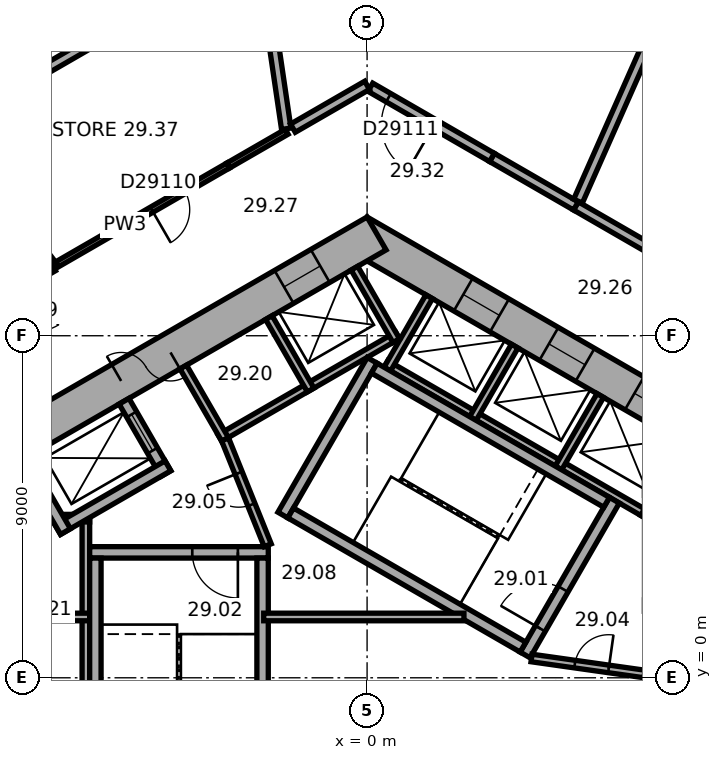
"""IFC4 building model, lengths in metres.
Left out: names, types, materials, properties, quantities, classifications, styles, units other than length and angle.
Written with IfcOpenShell. Run it as: python <this file> out.ifc"""

import sys

from ifc_helpers import new_model, si_unit, direction, frame, frame_2d, origin, place, context, subcontext, project, spatial, rectangle, extrude, element, fill, save


model = new_model("IFC4")
c1 = context("Model", 3, precision=1e-05, world=origin(), true_north=direction((0.0, 1.0)))
c2 = subcontext(c1, "Body", "Model", "MODEL_VIEW")
j1 = project(units=[si_unit("LENGTHUNIT", "METRE"), si_unit("PLANEANGLEUNIT", "RADIAN")], contexts=[c1])
p1 = place(None, origin())
s1 = spatial("IfcSite", under=j1, at=p1, CompositionType="ELEMENT")
p2 = place(p1, origin())
s2 = spatial("IfcBuilding", under=s1, at=p2, CompositionType="ELEMENT")
p3 = place(p2, frame((0.0, 0.0, 119.9)))
s3 = spatial("IfcBuildingStorey", under=s2, at=p3, CompositionType="ELEMENT", Elevation=119.9)
p4 = place(p3, frame((10.25, 5.629, 0.0), z_axis=(0.0, 0.0, 1.0), x_axis=(-0.866022616891, 0.50000482701, 0.0)))
e1 = element("IfcWall", 1, at=p4, inside=s3, PredefinedType="SHEAR", context=c2, shape_type="SweptSolid", body=[
    extrude(rectangle(XDim=12.125, YDim=1.0, at=frame_2d((6.062, 0.0))), origin(), (0.0, 0.0, 1.0), 4.5),
])
p5 = place(p4, frame((2.612, 0.0, 0.0)))
e2 = element("IfcOpeningElement", 2, at=p5, cuts=e1, PredefinedType="OPENING", context=c2, shape_type="SweptSolid", body=[
    extrude(rectangle(XDim=1.1, YDim=2.1, at=frame_2d((0.55, 1.05))), frame((0.0, 0.51, 0.0), z_axis=(0.0, -1.0, 0.0), x_axis=(1.0, 0.0, 0.0)), (0.0, 0.0, 1.0), 1.02),
])
p6 = place(p4, frame((5.212, 0.0, 0.0)))
e3 = element("IfcOpeningElement", 3, at=p6, cuts=e1, PredefinedType="OPENING", context=c2, shape_type="SweptSolid", body=[
    extrude(rectangle(XDim=1.1, YDim=2.1, at=frame_2d((0.55, 1.05))), frame((0.0, 0.51, 0.0), z_axis=(0.0, -1.0, 0.0), x_axis=(1.0, 0.0, 0.0)), (0.0, 0.0, 1.0), 1.02),
])
p7 = place(p4, frame((7.812, 0.0, 0.0)))
e4 = element("IfcOpeningElement", 4, at=p7, cuts=e1, PredefinedType="OPENING", context=c2, shape_type="SweptSolid", body=[
    extrude(rectangle(XDim=1.1, YDim=2.1, at=frame_2d((0.55, 1.05))), frame((0.0, 0.51, 0.0), z_axis=(0.0, -1.0, 0.0), x_axis=(1.0, 0.0, 0.0)), (0.0, 0.0, 1.0), 1.02),
])
p8 = place(p3, frame((0.25, 11.691, 0.0), z_axis=(0.0, 0.0, 1.0), x_axis=(-0.866022616891, -0.50000482701, 0.0)))
e5 = element("IfcWall", 5, at=p8, inside=s3, PredefinedType="SHEAR", context=c2, shape_type="SweptSolid", body=[
    extrude(rectangle(XDim=12.125, YDim=1.0, at=frame_2d((6.062, 0.0))), origin(), (0.0, 0.0, 1.0), 4.5),
])
p9 = place(p8, frame((6.262, 0.0, 0.0)))
e6 = element("IfcOpeningElement", 6, at=p9, cuts=e5, PredefinedType="OPENING", context=c2, shape_type="SweptSolid", body=[
    extrude(rectangle(XDim=1.5, YDim=2.1, at=frame_2d((0.75, 1.05))), frame((0.0, 0.51, 0.0), z_axis=(0.0, -1.0, 0.0), x_axis=(1.0, 0.0, 0.0)), (0.0, 0.0, 1.0), 1.02),
])
p10 = place(p8, frame((1.712, 0.0, 0.0)))
e7 = element("IfcOpeningElement", 7, at=p10, cuts=e5, PredefinedType="OPENING", context=c2, shape_type="SweptSolid", body=[
    extrude(rectangle(XDim=1.1, YDim=2.1, at=frame_2d((0.55, 1.05))), frame((0.0, 0.51, 0.0), z_axis=(0.0, -1.0, 0.0), x_axis=(1.0, 0.0, 0.0)), (0.0, 0.0, 1.0), 1.02),
])
p11 = place(p3, frame((20.63, 15.47, 0.0), z_axis=(0.0, 0.0, 1.0), x_axis=(-0.894934518609, 0.446197498203, 0.0)))
e8 = element("IfcWall", 8, at=p11, inside=s3, PredefinedType="STANDARD", context=c2, shape_type="SweptSolid", body=[
    extrude(rectangle(XDim=21.246, YDim=0.2, at=frame_2d((10.623, 0.0))), origin(), (0.0, 0.0, 1.0), 4.5),
])
p12 = place(p3, frame((-3.136, 24.805, 0.0), z_axis=(0.0, 0.0, 1.0), x_axis=(-0.866028291626, -0.499994998079, 0.0)))
e9 = element("IfcWall", 9, at=p12, inside=s3, PredefinedType="STANDARD", context=c2, shape_type="SweptSolid", body=[
    extrude(rectangle(XDim=21.246, YDim=0.2, at=frame_2d((10.623, 0.0))), origin(), (0.0, 0.0, 1.0), 4.5),
])
p13 = place(p3, frame((7.424, 4.259, 0.0), z_axis=(0.0, 0.0, 1.0), x_axis=(-0.866026010844, 0.49999894854, 0.0)))
e10 = element("IfcWall", 10, at=p13, inside=s3, PredefinedType="PARTITIONING", context=c2, shape_type="SweptSolid", body=[
    extrude(rectangle(XDim=8.0, YDim=0.2, at=frame_2d((4.0, 0.0))), origin(), (0.0, 0.0, 1.0), 4.22),
])
for number, where, z_axis, x_axis in (
    (11, (7.287, 4.222, 0.0), (0.0, 0.0, 1.0), (0.5, 0.866, 0.0)),
    (12, (5.036, 5.522, 0.0), (0.0, 0.0, 1.0), (0.5, 0.866, 0.0)),
    (13, (2.784, 6.822, 0.0), (0.0, 0.0, 1.0), (0.5, 0.866, 0.0)),
    (14, (0.532, 8.122, 0.0), (0.0, 0.0, 1.0), (0.5, 0.866, 0.0)),
):
    element("IfcWall", number, at=place(p3, frame(where, z_axis=z_axis, x_axis=x_axis)), inside=s3, PredefinedType="PARTITIONING", context=c2, shape_type="SweptSolid", body=[
        extrude(rectangle(XDim=2.2, YDim=0.2, at=frame_2d((1.1, 0.0))), origin(), (0.0, 0.0, 1.0), 4.22),
    ])
p14 = place(p3, frame((0.803, 9.009, 0.0), z_axis=(0.0, 0.0, 1.0), x_axis=(-0.866028230842, -0.499995103361, 0.0)))
e15 = element("IfcWall", 15, at=p14, inside=s3, PredefinedType="PARTITIONING", context=c2, shape_type="SweptSolid", body=[
    extrude(rectangle(XDim=5.4, YDim=0.2, at=frame_2d((2.7, 0.0))), origin(), (0.0, 0.0, 1.0), 4.22),
])
p15 = place(p3, frame((0.767, 8.872, 0.0), z_axis=(0.0, 0.0, 1.0), x_axis=(-0.499994660107, 0.866028486751, 0.0)))
e16 = element("IfcWall", 16, at=p15, inside=s3, PredefinedType="PARTITIONING", context=c2, shape_type="SweptSolid", body=[
    extrude(rectangle(XDim=2.2, YDim=0.2, at=frame_2d((1.1, 0.0))), origin(), (0.0, 0.0, 1.0), 4.22),
])
for number, where, z_axis, x_axis in (
    (17, (-1.485, 7.572, 0.0), (0.0, 0.0, 1.0), (-0.5, 0.866, 0.0)),
    (18, (-3.737, 6.272, 0.0), (0.0, 0.0, 1.0), (-0.5, 0.866, 0.0)),
):
    element("IfcWall", number, at=place(p3, frame(where, z_axis=z_axis, x_axis=x_axis)), inside=s3, PredefinedType="PARTITIONING", context=c2, shape_type="SweptSolid", body=[
        extrude(rectangle(XDim=2.2, YDim=0.2, at=frame_2d((1.1, 0.0))), origin(), (0.0, 0.0, 1.0), 4.22),
    ])
p16 = place(p3, frame((-7.4, 4.3, 0.0), z_axis=(0.0, 0.0, 1.0), x_axis=(0.0, -1.0, 0.0)))
e19 = element("IfcWall", 19, at=p16, inside=s3, PredefinedType="PARTITIONING", context=c2, shape_type="SweptSolid", body=[
    extrude(rectangle(XDim=8.0, YDim=0.2, at=frame_2d((4.0, 0.0))), origin(), (0.0, 0.0, 1.0), 4.22),
])
for number, where, z_axis, x_axis in (
    (20, (-7.3, 4.2, 0.0), (0.0, 0.0, 1.0), (-1.0, 0.0, 0.0)),
    (21, (-7.3, 1.6, 0.0), (0.0, 0.0, 1.0), (-1.0, 0.0, 0.0)),
):
    element("IfcWall", number, at=place(p3, frame(where, z_axis=z_axis, x_axis=x_axis)), inside=s3, PredefinedType="PARTITIONING", context=c2, shape_type="SweptSolid", body=[
        extrude(rectangle(XDim=2.2, YDim=0.2, at=frame_2d((1.1, 0.0))), origin(), (0.0, 0.0, 1.0), 4.22),
    ])
p17 = place(p3, frame((4.158, 0.602, 0.0), z_axis=(0.0, 0.0, 1.0), x_axis=(0.499977259774, 0.866038532462, 0.0)))
e22 = element("IfcWall", 22, at=p17, inside=s3, PredefinedType="SHEAR", context=c2, shape_type="SweptSolid", body=[
    extrude(rectangle(XDim=4.7, YDim=0.3, at=frame_2d((2.35, 0.0))), origin(), (0.0, 0.0, 1.0), 4.22),
])
p18 = place(p17, frame((0.8, 0.0, 0.0)))
e23 = element("IfcOpeningElement", 23, at=p18, cuts=e22, PredefinedType="OPENING", context=c2, shape_type="SweptSolid", body=[
    extrude(rectangle(XDim=1.2, YDim=2.1, at=frame_2d((0.6, 1.05))), frame((0.0, 0.16, 0.0), z_axis=(0.0, -1.0, 0.0), x_axis=(1.0, 0.0, 0.0)), (0.0, 0.0, 1.0), 0.32),
])
p19 = place(p3, frame((-2.216, 4.282, 0.0), z_axis=(0.0, 0.0, 1.0), x_axis=(0.499977259774, 0.866038532462, 0.0)))
e24 = element("IfcWall", 24, at=p19, inside=s3, PredefinedType="SHEAR", context=c2, shape_type="SweptSolid", body=[
    extrude(rectangle(XDim=4.7, YDim=0.3, at=frame_2d((2.35, 0.0))), origin(), (0.0, 0.0, 1.0), 4.22),
])
for number, where, z_axis, x_axis in (
    (25, (4.103, 0.807, 0.0), (0.0, 0.0, 1.0), (-0.866, 0.5, 0.0)),
    (26, (6.303, 4.617, 0.0), (0.0, 0.0, 1.0), (-0.866, 0.5, 0.0)),
):
    element("IfcWall", number, at=place(p3, frame(where, z_axis=z_axis, x_axis=x_axis)), inside=s3, PredefinedType="SHEAR", context=c2, shape_type="SweptSolid", body=[
        extrude(rectangle(XDim=7.06, YDim=0.3, at=frame_2d((3.53, 0.0))), origin(), (0.0, 0.0, 1.0), 4.22),
    ])
p20 = place(p3, frame((-2.6, 3.3, 0.0), z_axis=(0.0, 0.0, 1.0), x_axis=(-1.0, 0.0, 0.0)))
e27 = element("IfcWall", 27, at=p20, inside=s3, PredefinedType="SHEAR", context=c2, shape_type="SweptSolid", body=[
    extrude(rectangle(XDim=4.7, YDim=0.3, at=frame_2d((2.35, 0.0))), origin(), (0.0, 0.0, 1.0), 4.22),
])
p21 = place(p20, frame((0.8, 0.0, 0.0)))
e28 = element("IfcOpeningElement", 28, at=p21, cuts=e27, PredefinedType="OPENING", context=c2, shape_type="SweptSolid", body=[
    extrude(rectangle(XDim=1.2, YDim=2.1, at=frame_2d((0.6, 1.05))), frame((0.0, 0.16, 0.0), z_axis=(0.0, -1.0, 0.0), x_axis=(1.0, 0.0, 0.0)), (0.0, 0.0, 1.0), 0.32),
])
for number, where, z_axis, x_axis in (
    (29, (-2.75, 3.15, 0.0), (0.0, 0.0, 1.0), (0.0, -1.0, 0.0)),
    (30, (-7.15, 3.15, 0.0), (0.0, 0.0, 1.0), (0.0, -1.0, 0.0)),
):
    element("IfcWall", number, at=place(p3, frame(where, z_axis=z_axis, x_axis=x_axis)), inside=s3, PredefinedType="SHEAR", context=c2, shape_type="SweptSolid", body=[
        extrude(rectangle(XDim=7.06, YDim=0.3, at=frame_2d((3.53, 0.0))), origin(), (0.0, 0.0, 1.0), 4.22),
    ])
p22 = place(p3, frame((4.327, 0.521, 0.0), z_axis=(0.0, 0.0, 1.0), x_axis=(0.990124376366, -0.14019172346, 0.0)))
e31 = element("IfcWall", 31, at=p22, inside=s3, PredefinedType="PARTITIONING", context=c2, shape_type="SweptSolid", body=[
    extrude(rectangle(XDim=3.002, YDim=0.2, at=frame_2d((1.501, 0.0))), origin(), (0.0, 0.0, 1.0), 4.22),
])
p23 = place(p22, frame((1.15, 0.0, 0.0)))
e32 = element("IfcOpeningElement", 32, at=p23, cuts=e31, PredefinedType="OPENING", context=c2, shape_type="SweptSolid", body=[
    extrude(rectangle(XDim=0.9, YDim=2.1, at=frame_2d((0.45, 1.05))), frame((0.0, 0.11, 0.0), z_axis=(0.0, -1.0, 0.0), x_axis=(1.0, 0.0, 0.0)), (0.0, 0.0, 1.0), 0.22),
])
p24 = place(p3, frame((-5.295, 5.372, 0.0), z_axis=(0.0, 0.0, 1.0), x_axis=(-0.500077893725, 0.86598042715, 0.0)))
e33 = element("IfcWall", 33, at=p24, inside=s3, PredefinedType="SHEAR", context=c2, shape_type="SweptSolid", body=[
    extrude(rectangle(XDim=2.2, YDim=0.3, at=frame_2d((1.1, 0.0))), origin(), (0.0, 0.0, 1.0), 4.22),
])
p25 = place(p24, frame((0.7, 0.0, 0.0)))
e34 = element("IfcOpeningElement", 34, at=p25, cuts=e33, PredefinedType="OPENING", context=c2, shape_type="SweptSolid", body=[
    extrude(rectangle(XDim=1.1, YDim=2.1, at=frame_2d((0.55, 1.05))), frame((0.0, 0.16, 0.0), z_axis=(0.0, -1.0, 0.0), x_axis=(1.0, 0.0, 0.0)), (0.0, 0.0, 1.0), 0.32),
])
p26 = place(p3, frame((-5.24, 5.577, 0.0), z_axis=(0.0, 0.0, 1.0), x_axis=(-0.866014461049, -0.500018952895, 0.0)))
e35 = element("IfcWall", 35, at=p26, inside=s3, PredefinedType="SHEAR", context=c2, shape_type="SweptSolid", body=[
    extrude(rectangle(XDim=3.35, YDim=0.3, at=frame_2d((1.675, 0.0))), origin(), (0.0, 0.0, 1.0), 4.22),
])
p27 = place(p3, frame((-7.937, 3.847, 0.0), z_axis=(0.0, 0.0, 1.0), x_axis=(-0.50002983664, 0.866008176907, 0.0)))
e36 = element("IfcWall", 36, at=p27, inside=s3, PredefinedType="SHEAR", context=c2, shape_type="SweptSolid", body=[
    extrude(rectangle(XDim=2.2, YDim=0.3, at=frame_2d((1.1, 0.0))), origin(), (0.0, 0.0, 1.0), 4.22),
])
p28 = place(p3, frame((-2.615, 3.487, 0.0), z_axis=(0.0, 0.0, 1.0), x_axis=(-0.373576831041, 0.92759924068, 0.0)))
e37 = element("IfcWall", 37, at=p28, inside=s3, PredefinedType="PARTITIONING", context=c2, shape_type="SweptSolid", body=[
    extrude(rectangle(XDim=3.002, YDim=0.2, at=frame_2d((1.501, 0.0))), origin(), (0.0, 0.0, 1.0), 4.22),
])
p29 = place(p28, frame((1.15, 0.0, 0.0)))
e38 = element("IfcOpeningElement", 38, at=p29, cuts=e37, PredefinedType="OPENING", context=c2, shape_type="SweptSolid", body=[
    extrude(rectangle(XDim=0.9, YDim=2.1, at=frame_2d((0.45, 1.05))), frame((0.0, 0.11, 0.0), z_axis=(0.0, -1.0, 0.0), x_axis=(1.0, 0.0, 0.0)), (0.0, 0.0, 1.0), 0.22),
])
p30 = place(p3, frame((-2.72, 1.6, 0.0), z_axis=(0.0, 0.0, 1.0), x_axis=(1.0, 0.0, 0.0)))
e39 = element("IfcWall", 39, at=p30, inside=s3, PredefinedType="PARTITIONING", context=c2, shape_type="SweptSolid", body=[
    extrude(rectangle(XDim=5.269, YDim=0.2, at=frame_2d((2.634, 0.0))), origin(), (0.0, 0.0, 1.0), 4.22),
])
p31 = place(p3, frame((10.186, 9.708, 0.0), z_axis=(0.0, 0.0, 1.0), x_axis=(-0.866018196172, 0.500012483742, 0.0)))
e40 = element("IfcWall", 40, at=p31, inside=s3, PredefinedType="SOLIDWALL", context=c2, shape_type="SweptSolid", body=[
    extrude(rectangle(XDim=5.416, YDim=0.25, at=frame_2d((2.708, 0.0))), origin(), (0.0, 0.0, 1.0), 4.22),
])
p32 = place(p31, frame((0.25, 0.0, 0.0)))
e41 = element("IfcOpeningElement", 41, at=p32, cuts=e40, PredefinedType="OPENING", context=c2, shape_type="SweptSolid", body=[
    extrude(rectangle(XDim=1.4, YDim=2.1, at=frame_2d((0.7, 1.05))), frame((0.0, 0.135, 0.0), z_axis=(0.0, -1.0, 0.0), x_axis=(1.0, 0.0, 0.0)), (0.0, 0.0, 1.0), 0.27),
])
p33 = place(p3, frame((-8.262, 10.818, 0.0), z_axis=(0.0, 0.0, 1.0), x_axis=(-0.866006491466, -0.500032755666, 0.0)))
e42 = element("IfcWall", 42, at=p33, inside=s3, PredefinedType="SOLIDWALL", context=c2, shape_type="SweptSolid", body=[
    extrude(rectangle(XDim=5.948, YDim=0.25, at=frame_2d((2.974, 0.0))), origin(), (0.0, 0.0, 1.0), 4.22),
])
p34 = place(p33, frame((0.65, 0.0, 0.0)))
e43 = element("IfcOpeningElement", 43, at=p34, cuts=e42, PredefinedType="OPENING", context=c2, shape_type="SweptSolid", body=[
    extrude(rectangle(XDim=1.4, YDim=2.1, at=frame_2d((0.7, 1.05))), frame((0.0, 0.135, 0.0), z_axis=(0.0, -1.0, 0.0), x_axis=(1.0, 0.0, 0.0)), (0.0, 0.0, 1.0), 0.27),
])
p35 = place(p3, frame((-8.159, 10.878, 0.0), z_axis=(0.0, 0.0, 1.0), x_axis=(0.866031891337, 0.499988763061, 0.0)))
e44 = element("IfcWall", 44, at=p35, inside=s3, PredefinedType="PARTITIONING", context=c2, shape_type="SweptSolid", body=[
    extrude(rectangle(XDim=4.126, YDim=0.15, at=frame_2d((2.063, 0.0))), origin(), (0.0, 0.0, 1.0), 4.22),
])
p36 = place(p35, frame((2.877, 0.0, 0.0)))
e45 = element("IfcOpeningElement", 45, at=p36, cuts=e44, PredefinedType="OPENING", context=c2, shape_type="SweptSolid", body=[
    extrude(rectangle(XDim=1.0, YDim=2.1, at=frame_2d((0.5, 1.05))), frame((0.0, 0.085, 0.0), z_axis=(0.0, -1.0, 0.0), x_axis=(1.0, 0.0, 0.0)), (0.0, 0.0, 1.0), 0.17),
])
p37 = place(p3, frame((-8.348, 10.929, 0.0), z_axis=(0.0, 0.0, 1.0), x_axis=(-0.606915548717, 0.794766328379, 0.0)))
e46 = element("IfcWall", 46, at=p37, inside=s3, PredefinedType="SOLIDWALL", context=c2, shape_type="SweptSolid", body=[
    extrude(rectangle(XDim=1.441, YDim=0.25, at=frame_2d((0.721, 0.0))), origin(), (0.0, 0.0, 1.0), 3.2),
])
p38 = place(p3, frame((5.495, 12.416, 0.0), z_axis=(0.0, 0.0, 1.0), x_axis=(-0.866043744811, 0.499968231064, 0.0)))
e47 = element("IfcWall", 47, at=p38, inside=s3, PredefinedType="SOLIDWALL", context=c2, shape_type="SweptSolid", body=[
    extrude(rectangle(XDim=2.551, YDim=0.25, at=frame_2d((1.275, 0.0))), origin(), (0.0, 0.0, 1.0), 4.22),
])
p39 = place(p3, frame((-4.585, 12.941, 0.0), z_axis=(0.0, 0.0, 1.0), x_axis=(0.866022692473, 0.500004696101, 0.0)))
e48 = element("IfcWall", 48, at=p39, inside=s3, PredefinedType="PARTITIONING", context=c2, shape_type="SweptSolid", body=[
    extrude(rectangle(XDim=1.073, YDim=0.15, at=frame_2d((0.537, 0.0))), origin(), (0.0, 0.0, 1.0), 4.22),
])
p40 = place(p3, frame((3.286, 13.691, 0.0), z_axis=(0.0, 0.0, 1.0), x_axis=(-0.866013897511, 0.50001992892, 0.0)))
e49 = element("IfcWall", 49, at=p40, inside=s3, PredefinedType="SOLIDWALL", context=c2, shape_type="SweptSolid", body=[
    extrude(rectangle(XDim=3.694, YDim=0.25, at=frame_2d((1.847, 0.0))), origin(), (0.0, 0.0, 1.0), 4.22),
])
p41 = place(p40, frame((1.744, 0.0, 0.0)))
e50 = element("IfcOpeningElement", 50, at=p41, cuts=e49, PredefinedType="OPENING", context=c2, shape_type="SweptSolid", body=[
    extrude(rectangle(XDim=1.4, YDim=2.1, at=frame_2d((0.7, 1.05))), frame((0.0, 0.135, 0.0), z_axis=(0.0, -1.0, 0.0), x_axis=(1.0, 0.0, 0.0)), (0.0, 0.0, 1.0), 0.27),
])
p42 = place(p3, frame((-2.115, 14.367, 0.0), z_axis=(0.0, 0.0, 1.0), x_axis=(-0.866020974757, -0.500007671222, 0.0)))
e51 = element("IfcWall", 51, at=p42, inside=s3, PredefinedType="PARTITIONING", context=c2, shape_type="SweptSolid", body=[
    extrude(rectangle(XDim=1.778, YDim=0.15, at=frame_2d((0.889, 0.0))), origin(), (0.0, 0.0, 1.0), 4.22),
])
p43 = place(p3, frame((-2.127, 14.447, 0.0), z_axis=(0.0, 0.0, 1.0), x_axis=(-0.145734161627, 0.989323786298, 0.0)))
e52 = element("IfcWall", 52, at=p43, inside=s3, PredefinedType="SOLIDWALL", context=c2, shape_type="SweptSolid", body=[
    extrude(rectangle(XDim=4.682, YDim=0.25, at=frame_2d((2.341, 0.0))), origin(), (0.0, 0.0, 1.0), 3.2),
])
p44 = place(p3, frame((-1.952, 14.461, 0.0), z_axis=(0.0, 0.0, 1.0), x_axis=(0.866075582212, 0.499913078341, 0.0)))
e53 = element("IfcWall", 53, at=p44, inside=s3, PredefinedType="SOLIDWALL", context=c2, shape_type="SweptSolid", body=[
    extrude(rectangle(XDim=2.254, YDim=0.25, at=frame_2d((1.127, 0.0))), origin(), (0.0, 0.0, 1.0), 4.22),
])
p45 = place(p3, frame((-11.078, 14.504, 0.0), z_axis=(0.0, 0.0, 1.0), x_axis=(0.866009996143, 0.500026685868, 0.0)))
e54 = element("IfcWall", 54, at=p45, inside=s3, PredefinedType="SOLIDWALL", context=c2, shape_type="SweptSolid", body=[
    extrude(rectangle(XDim=9.517, YDim=0.25, at=frame_2d((4.758, 0.0))), origin(), (0.0, 0.0, 1.0), 4.22),
])
p46 = place(p3, frame((7.367, 16.646, 0.0), z_axis=(0.0, 0.0, 1.0), x_axis=(-0.404689706038, -0.914454067642, 0.0)))
e55 = element("IfcWall", 55, at=p46, inside=s3, PredefinedType="SOLIDWALL", context=c2, shape_type="SweptSolid", body=[
    extrude(rectangle(XDim=4.489, YDim=0.25, at=frame_2d((2.245, 0.0))), origin(), (0.0, 0.0, 1.0), 3.2),
])
p47 = place(p9, origin())
e56 = element("IfcDoor", 56, at=p47, inside=s3, OperationType="DOUBLE_DOOR_SINGLE_SWING", PredefinedType="DOOR", context=c2, shape_type="SweptSolid", body=[
    extrude(rectangle(XDim=1.5, YDim=2.1, at=frame_2d((0.75, 1.05))), frame((0.0, 0.025, 0.0), z_axis=(0.0, -1.0, 0.0), x_axis=(1.0, 0.0, 0.0)), (0.0, 0.0, 1.0), 0.05),
])
fill(e6, e56)
p48 = place(p18, origin())
e57 = element("IfcDoor", 57, at=p48, inside=s3, OperationType="SINGLE_SWING_RIGHT", PredefinedType="DOOR", context=c2, shape_type="SweptSolid", body=[
    extrude(rectangle(XDim=1.2, YDim=2.1, at=frame_2d((0.6, 1.05))), frame((0.0, 0.025, 0.0), z_axis=(0.0, -1.0, 0.0), x_axis=(1.0, 0.0, 0.0)), (0.0, 0.0, 1.0), 0.05),
])
fill(e23, e57)
p49 = place(p21, origin())
e58 = element("IfcDoor", 58, at=p49, inside=s3, OperationType="SINGLE_SWING_RIGHT", PredefinedType="DOOR", context=c2, shape_type="SweptSolid", body=[
    extrude(rectangle(XDim=1.2, YDim=2.1, at=frame_2d((0.6, 1.05))), frame((0.0, 0.025, 0.0), z_axis=(0.0, -1.0, 0.0), x_axis=(1.0, 0.0, 0.0)), (0.0, 0.0, 1.0), 0.05),
])
fill(e28, e58)
p50 = place(p23, origin())
e59 = element("IfcDoor", 59, at=p50, inside=s3, OperationType="SINGLE_SWING_LEFT", PredefinedType="DOOR", context=c2, shape_type="SweptSolid", body=[
    extrude(rectangle(XDim=0.9, YDim=2.1, at=frame_2d((0.45, 1.05))), frame((0.0, 0.025, 0.0), z_axis=(0.0, -1.0, 0.0), x_axis=(1.0, 0.0, 0.0)), (0.0, 0.0, 1.0), 0.05),
])
fill(e32, e59)
p51 = place(p29, origin())
e60 = element("IfcDoor", 60, at=p51, inside=s3, OperationType="SINGLE_SWING_LEFT", PredefinedType="DOOR", context=c2, shape_type="SweptSolid", body=[
    extrude(rectangle(XDim=0.9, YDim=2.1, at=frame_2d((0.45, 1.05))), frame((0.0, 0.025, 0.0), z_axis=(0.0, -1.0, 0.0), x_axis=(1.0, 0.0, 0.0)), (0.0, 0.0, 1.0), 0.05),
])
fill(e38, e60)
p52 = place(p25, origin())
e61 = element("IfcDoor", 61, at=p52, inside=s3, OperationType="DOUBLE_DOOR_SLIDING", PredefinedType="DOOR", context=c2, shape_type="SweptSolid", body=[
    extrude(rectangle(XDim=1.1, YDim=2.1, at=frame_2d((0.55, 1.05))), frame((0.0, 0.025, 0.0), z_axis=(0.0, -1.0, 0.0), x_axis=(1.0, 0.0, 0.0)), (0.0, 0.0, 1.0), 0.05),
])
fill(e34, e61)
p53 = place(p5, origin())
e62 = element("IfcDoor", 62, at=p53, inside=s3, OperationType="DOUBLE_DOOR_SLIDING", PredefinedType="DOOR", context=c2, shape_type="SweptSolid", body=[
    extrude(rectangle(XDim=1.1, YDim=2.1, at=frame_2d((0.55, 1.05))), frame((0.0, 0.025, 0.0), z_axis=(0.0, -1.0, 0.0), x_axis=(1.0, 0.0, 0.0)), (0.0, 0.0, 1.0), 0.05),
])
fill(e2, e62)
p54 = place(p6, origin())
e63 = element("IfcDoor", 63, at=p54, inside=s3, OperationType="DOUBLE_DOOR_SLIDING", PredefinedType="DOOR", context=c2, shape_type="SweptSolid", body=[
    extrude(rectangle(XDim=1.1, YDim=2.1, at=frame_2d((0.55, 1.05))), frame((0.0, 0.025, 0.0), z_axis=(0.0, -1.0, 0.0), x_axis=(1.0, 0.0, 0.0)), (0.0, 0.0, 1.0), 0.05),
])
fill(e3, e63)
p55 = place(p7, origin())
e64 = element("IfcDoor", 64, at=p55, inside=s3, OperationType="DOUBLE_DOOR_SLIDING", PredefinedType="DOOR", context=c2, shape_type="SweptSolid", body=[
    extrude(rectangle(XDim=1.1, YDim=2.1, at=frame_2d((0.55, 1.05))), frame((0.0, 0.025, 0.0), z_axis=(0.0, -1.0, 0.0), x_axis=(1.0, 0.0, 0.0)), (0.0, 0.0, 1.0), 0.05),
])
fill(e4, e64)
p56 = place(p10, origin())
e65 = element("IfcDoor", 65, at=p56, inside=s3, OperationType="DOUBLE_DOOR_SLIDING", PredefinedType="DOOR", context=c2, shape_type="SweptSolid", body=[
    extrude(rectangle(XDim=1.1, YDim=2.1, at=frame_2d((0.55, 1.05))), frame((0.0, 0.025, 0.0), z_axis=(0.0, -1.0, 0.0), x_axis=(1.0, 0.0, 0.0)), (0.0, 0.0, 1.0), 0.05),
])
fill(e7, e65)
p57 = place(p36, origin())
e66 = element("IfcDoor", 66, at=p57, inside=s3, OperationType="SINGLE_SWING_LEFT", PredefinedType="DOOR", context=c2, shape_type="SweptSolid", body=[
    extrude(rectangle(XDim=1.0, YDim=2.1, at=frame_2d((0.5, 1.05))), frame((0.0, 0.025, 0.0), z_axis=(0.0, -1.0, 0.0), x_axis=(1.0, 0.0, 0.0)), (0.0, 0.0, 1.0), 0.05),
])
fill(e45, e66)
p58 = place(p41, origin())
e67 = element("IfcDoor", 67, at=p58, inside=s3, OperationType="SINGLE_SWING_LEFT", PredefinedType="DOOR", context=c2, shape_type="SweptSolid", body=[
    extrude(rectangle(XDim=1.4, YDim=2.1, at=frame_2d((0.7, 1.05))), frame((0.0, 0.025, 0.0), z_axis=(0.0, -1.0, 0.0), x_axis=(1.0, 0.0, 0.0)), (0.0, 0.0, 1.0), 0.05),
])
fill(e50, e67)
save(model, sys.argv[1])
